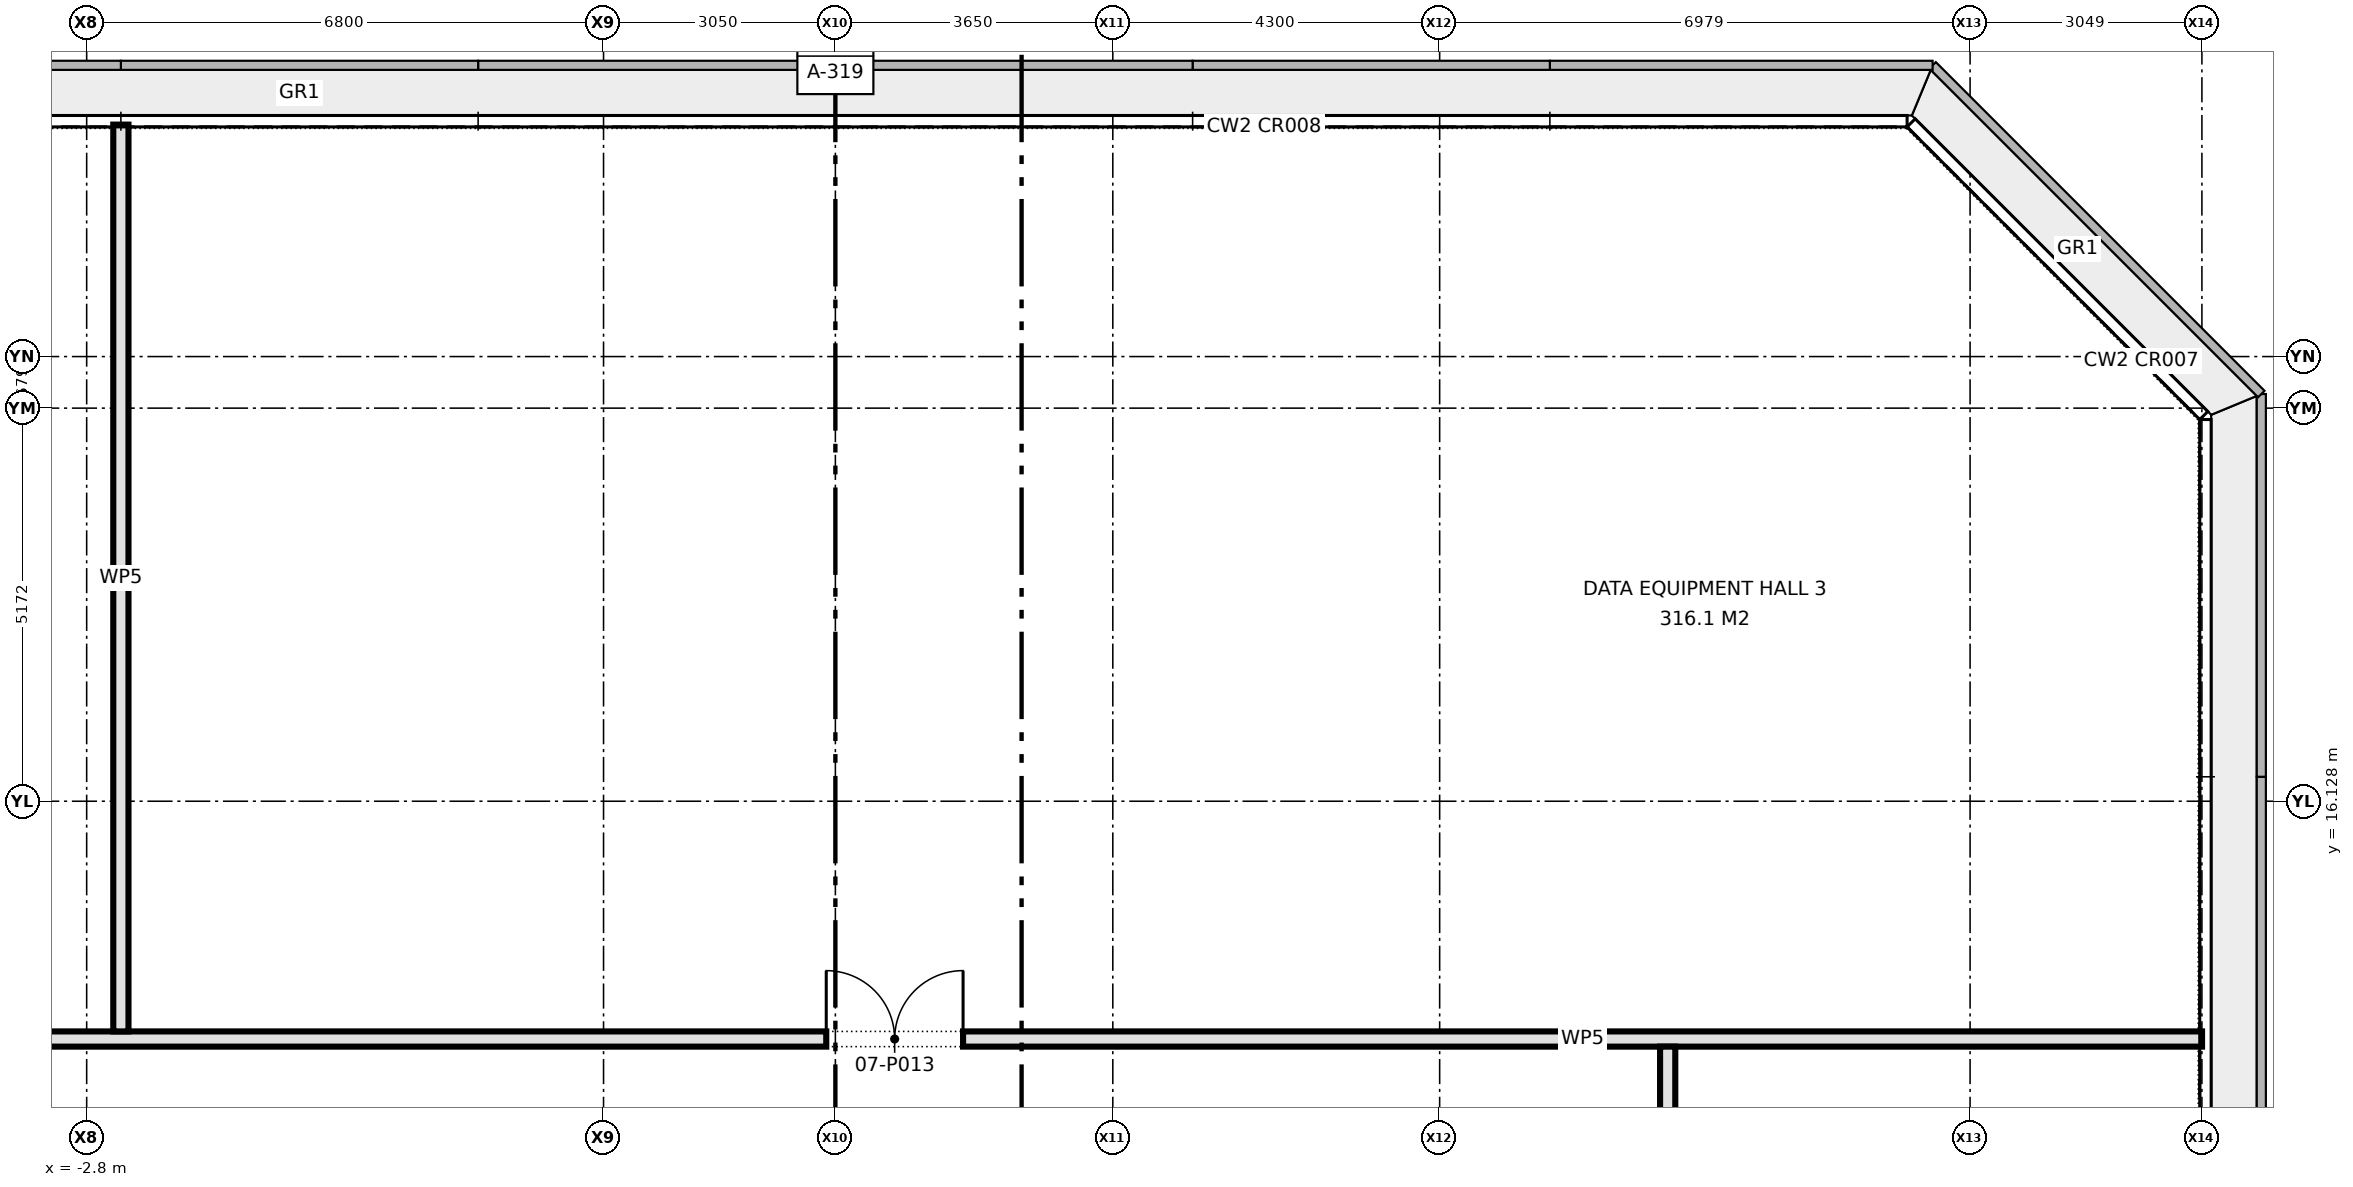
"""IFC4 building model, lengths in metres.
Left out: names, types, materials, properties, quantities, classifications, styles, units other than length and angle.
Written with IfcOpenShell. Run it as: python <this file> out.ifc"""

import sys

from ifc_helpers import new_model, si_unit, direction, frame, frame_2d, origin, place, context, subcontext, project, spatial, rectangle, extrude, element, fill, save


model = new_model("IFC4")
c1 = context("Model", 3, precision=1e-05, world=origin(), true_north=direction((0.0, 1.0)))
c2 = subcontext(c1, "Body", "Model", "MODEL_VIEW")
j1 = project(units=[si_unit("LENGTHUNIT", "METRE"), si_unit("PLANEANGLEUNIT", "RADIAN")], contexts=[c1])
p1 = place(None, origin())
s1 = spatial("IfcSite", under=j1, at=p1, CompositionType="ELEMENT")
p2 = place(p1, origin())
s2 = spatial("IfcBuilding", under=s1, at=p2, CompositionType="ELEMENT")
p3 = place(p2, frame((0.0, 0.0, 30.5)))
s3 = spatial("IfcBuildingStorey", under=s2, at=p3, CompositionType="ELEMENT", Elevation=30.5)
p4 = place(p3, frame((-25.03, 13.0, 0.0), z_axis=(0.0, 0.0, 1.0), x_axis=(1.0, 0.0, 0.0)))
e1 = element("IfcWall", 1, at=p4, inside=s3, PredefinedType="PARTITIONING", context=c2, shape_type="SweptSolid", body=[
    extrude(rectangle(XDim=50.06, YDim=0.2, at=frame_2d((25.03, 0.0))), origin(), (0.0, 0.0, 1.0), 4.575),
])
p5 = place(p4, frame((15.855, 0.0, 0.0)))
e2 = element("IfcOpeningElement", 2, at=p5, cuts=e1, PredefinedType="OPENING", context=c2, shape_type="SweptSolid", body=[
    extrude(rectangle(XDim=1.8, YDim=2.1, at=frame_2d((0.9, 1.05))), frame((0.0, 0.11, 0.0), z_axis=(0.0, -1.0, 0.0), x_axis=(1.0, 0.0, 0.0)), (0.0, 0.0, 1.0), 0.22),
])
p6 = place(p4, frame((8.03, 0.0, 0.0)))
e3 = element("IfcOpeningElement", 3, at=p6, cuts=e1, PredefinedType="OPENING", context=c2, shape_type="SweptSolid", body=[
    extrude(rectangle(XDim=1.8, YDim=2.1, at=frame_2d((0.9, 1.05))), frame((0.0, 0.11, 0.0), z_axis=(0.0, -1.0, 0.0), x_axis=(1.0, 0.0, 0.0)), (0.0, 0.0, 1.0), 0.22),
])
p7 = place(p4, frame((31.96, 0.0, 0.0)))
e4 = element("IfcOpeningElement", 4, at=p7, cuts=e1, PredefinedType="OPENING", context=c2, shape_type="SweptSolid", body=[
    extrude(rectangle(XDim=1.8, YDim=2.1, at=frame_2d((0.9, 1.05))), frame((0.0, 0.11, 0.0), z_axis=(0.0, -1.0, 0.0), x_axis=(1.0, 0.0, 0.0)), (0.0, 0.0, 1.0), 0.22),
])
p8 = place(p3, frame((18.0, -12.9, 0.0), z_axis=(0.0, 0.0, 1.0), x_axis=(0.0, 1.0, 0.0)))
e5 = element("IfcWall", 5, at=p8, inside=s3, PredefinedType="PARTITIONING", context=c2, shape_type="SweptSolid", body=[
    extrude(rectangle(XDim=25.8, YDim=0.2, at=frame_2d((12.9, 0.0))), origin(), (0.0, 0.0, 1.0), 4.575),
])
p9 = place(p8, frame((4.725, 0.0, 0.0)))
e6 = element("IfcOpeningElement", 6, at=p9, cuts=e5, PredefinedType="OPENING", context=c2, shape_type="SweptSolid", body=[
    extrude(rectangle(XDim=1.0, YDim=2.1, at=frame_2d((0.5, 1.05))), frame((0.0, 0.11, 0.0), z_axis=(0.0, -1.0, 0.0), x_axis=(1.0, 0.0, 0.0)), (0.0, 0.0, 1.0), 0.22),
])
p10 = place(p8, frame((14.65, 0.0, 0.0)))
e7 = element("IfcOpeningElement", 7, at=p10, cuts=e5, PredefinedType="OPENING", context=c2, shape_type="SweptSolid", body=[
    extrude(rectangle(XDim=1.2, YDim=2.1, at=frame_2d((0.6, 1.05))), frame((0.0, 0.11, 0.0), z_axis=(0.0, -1.0, 0.0), x_axis=(1.0, 0.0, 0.0)), (0.0, 0.0, 1.0), 0.22),
])
p11 = place(p8, frame((22.025, 0.0, 0.0)))
e8 = element("IfcOpeningElement", 8, at=p11, cuts=e5, PredefinedType="OPENING", context=c2, shape_type="SweptSolid", body=[
    extrude(rectangle(XDim=1.8, YDim=2.1, at=frame_2d((0.9, 1.05))), frame((0.0, 0.11, 0.0), z_axis=(0.0, -1.0, 0.0), x_axis=(1.0, 0.0, 0.0)), (0.0, 0.0, 1.0), 0.22),
])
p12 = place(p3, frame((-2.35, 13.1, 0.0), z_axis=(0.0, 0.0, 1.0), x_axis=(0.0, 1.0, 0.0)))
e9 = element("IfcWall", 9, at=p12, inside=s3, PredefinedType="PARTITIONING", context=c2, shape_type="SweptSolid", body=[
    extrude(rectangle(XDim=11.93, YDim=0.2, at=frame_2d((5.965, 0.0))), origin(), (0.0, 0.0, 1.0), 4.575),
])
p13 = place(p7, origin())
e10 = element("IfcDoor", 10, at=p13, inside=s3, OperationType="DOUBLE_DOOR_SINGLE_SWING", PredefinedType="DOOR", context=c2, shape_type="SweptSolid", body=[
    extrude(rectangle(XDim=1.8, YDim=2.1, at=frame_2d((0.9, 1.05))), frame((0.0, 0.025, 0.0), z_axis=(0.0, -1.0, 0.0), x_axis=(1.0, 0.0, 0.0)), (0.0, 0.0, 1.0), 0.05),
])
fill(e4, e10)
save(model, sys.argv[1])
